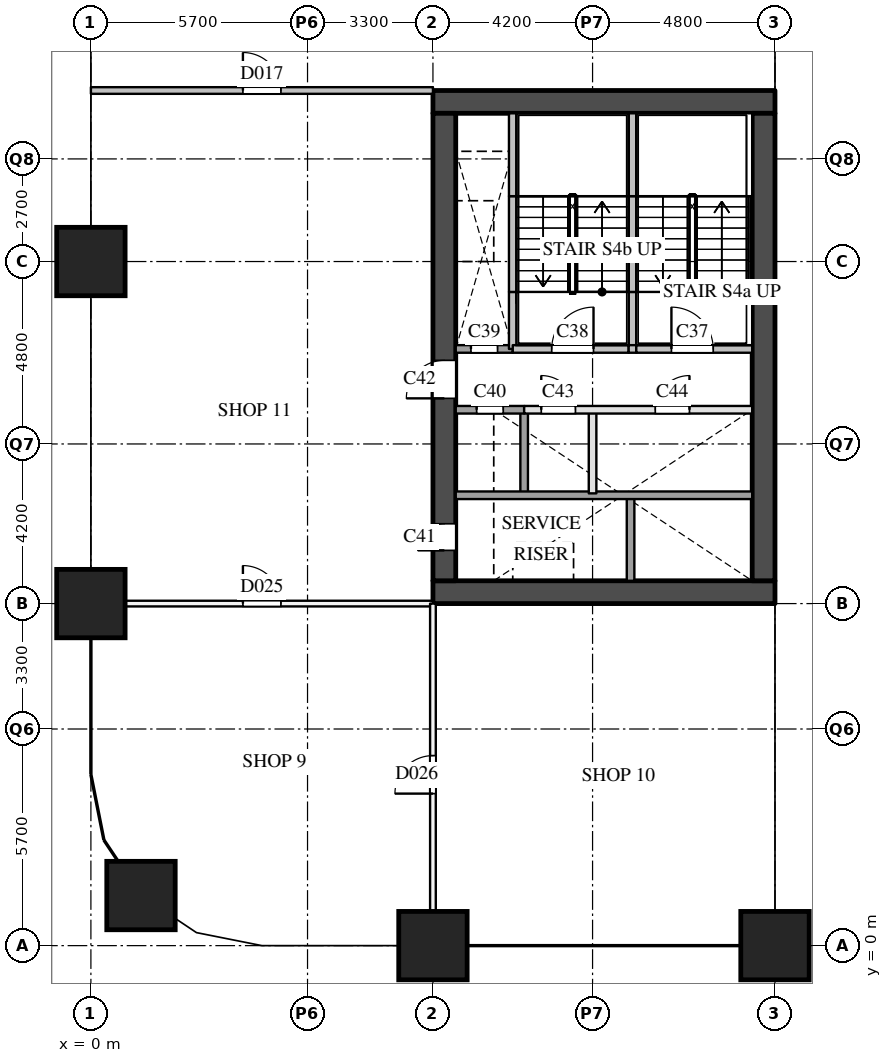
"""IFC4 building model, lengths in metres.
Left out: names, types, materials, properties, quantities, classifications, styles, units other than length and angle.
Written with IfcOpenShell. Run it as: python <this file> out.ifc"""

import sys

from ifc_helpers import new_model, si_unit, direction, frame, frame_2d, origin, origin_2d, place, context, subcontext, project, spatial, rectangle, extrude, element, fill, save


model = new_model("IFC4")
c1 = context("Model", 3, precision=1e-05, world=origin(), true_north=direction((0.0, 1.0)))
c2 = subcontext(c1, "Body", "Model", "MODEL_VIEW")
j1 = project(units=[si_unit("LENGTHUNIT", "METRE"), si_unit("PLANEANGLEUNIT", "RADIAN")], contexts=[c1])
p1 = place(None, origin())
s1 = spatial("IfcSite", under=j1, at=p1, CompositionType="ELEMENT")
p2 = place(p1, origin())
s2 = spatial("IfcBuilding", under=s1, at=p2, CompositionType="ELEMENT")
p3 = place(p2, frame((0.0, 0.0, 14.0)))
s3 = spatial("IfcBuildingStorey", under=s2, at=p3, CompositionType="ELEMENT", Elevation=14.0)
for number, where, z_axis, x_axis in (
    (1, (1.318, 1.318, 0.0), (0.0, 0.0, 1.0), (1.0, 0.0, 0.0)),
    (2, (0.0, 9.0, 0.0), (0.0, 0.0, 1.0), (1.0, 0.0, 0.0)),
    (3, (0.0, 18.0, 0.0), (0.0, 0.0, 1.0), (1.0, 0.0, 0.0)),
    (4, (9.0, 0.0, 0.0), (0.0, 0.0, 1.0), (1.0, 0.0, 0.0)),
    (5, (18.0, 0.0, 0.0), (0.0, 0.0, 1.0), (1.0, 0.0, 0.0)),
):
    element("IfcColumn", number, at=place(p3, frame(where, z_axis=z_axis, x_axis=x_axis)), inside=s3, PredefinedType="COLUMN", context=c2, shape_type="SweptSolid", body=[
        extrude(rectangle(XDim=1.8, YDim=1.8, at=origin_2d()), origin(), (0.0, 0.0, 1.0), 7.0),
    ])
for number, where, z_axis, x_axis in (
    (6, (9.0, 9.3, 0.0), (0.0, 0.0, 1.0), (1.0, 0.0, 0.0)),
    (7, (9.0, 22.2, 0.0), (0.0, 0.0, 1.0), (1.0, 0.0, 0.0)),
):
    element("IfcWall", number, at=place(p3, frame(where, z_axis=z_axis, x_axis=x_axis)), inside=s3, PredefinedType="SHEAR", context=c2, shape_type="SweptSolid", body=[
        extrude(rectangle(XDim=9.0, YDim=0.6, at=frame_2d((4.5, 0.0))), origin(), (0.0, 0.0, 1.0), 6.59),
    ])
p4 = place(p3, frame((9.3, 9.6, 0.0), z_axis=(0.0, 0.0, 1.0), x_axis=(0.0, 1.0, 0.0)))
e8 = element("IfcWall", 8, at=p4, inside=s3, PredefinedType="SHEAR", context=c2, shape_type="SweptSolid", body=[
    extrude(rectangle(XDim=12.3, YDim=0.6, at=frame_2d((6.15, 0.0))), origin(), (0.0, 0.0, 1.0), 6.59),
])
p5 = place(p4, frame((0.8, 0.0, 0.0)))
e9 = element("IfcOpeningElement", 9, at=p5, cuts=e8, PredefinedType="OPENING", context=c2, shape_type="SweptSolid", body=[
    extrude(rectangle(XDim=0.7, YDim=2.1, at=frame_2d((0.35, 1.05))), frame((0.0, 0.31, 0.0), z_axis=(0.0, -1.0, 0.0), x_axis=(1.0, 0.0, 0.0)), (0.0, 0.0, 1.0), 0.62),
])
p6 = place(p4, frame((4.8, 0.0, 0.0)))
e10 = element("IfcOpeningElement", 10, at=p6, cuts=e8, PredefinedType="OPENING", context=c2, shape_type="SweptSolid", body=[
    extrude(rectangle(XDim=1.0, YDim=2.1, at=frame_2d((0.5, 1.05))), frame((0.0, 0.31, 0.0), z_axis=(0.0, -1.0, 0.0), x_axis=(1.0, 0.0, 0.0)), (0.0, 0.0, 1.0), 0.62),
])
p7 = place(p3, frame((17.7, 9.6, 0.0), z_axis=(0.0, 0.0, 1.0), x_axis=(0.0, 1.0, 0.0)))
e11 = element("IfcWall", 11, at=p7, inside=s3, PredefinedType="SHEAR", context=c2, shape_type="SweptSolid", body=[
    extrude(rectangle(XDim=12.3, YDim=0.6, at=frame_2d((6.15, 0.0))), origin(), (0.0, 0.0, 1.0), 6.59),
])
p8 = place(p3, frame((11.1, 15.7, 0.0), z_axis=(0.0, 0.0, 1.0), x_axis=(0.0, 1.0, 0.0)))
e12 = element("IfcWall", 12, at=p8, inside=s3, PredefinedType="SOLIDWALL", context=c2, shape_type="SweptSolid", body=[
    extrude(rectangle(XDim=1.5, YDim=0.2, at=frame_2d((0.75, 0.0))), origin(), (0.0, 0.0, 1.0), 6.59),
])
p9 = place(p3, frame((11.1, 17.2, 0.0), z_axis=(0.0, 0.0, 1.0), x_axis=(0.0, 1.0, 0.0)))
e13 = element("IfcWall", 13, at=p9, inside=s3, PredefinedType="SOLIDWALL", context=c2, shape_type="SweptSolid", body=[
    extrude(rectangle(XDim=2.52, YDim=0.2, at=frame_2d((1.26, 0.0))), origin(), (0.0, 0.0, 1.0), 6.59),
])
p10 = place(p3, frame((11.1, 19.72, 0.0), z_axis=(0.0, 0.0, 1.0), x_axis=(0.0, 1.0, 0.0)))
e14 = element("IfcWall", 14, at=p10, inside=s3, PredefinedType="SOLIDWALL", context=c2, shape_type="SweptSolid", body=[
    extrude(rectangle(XDim=2.18, YDim=0.2, at=frame_2d((1.09, 0.0))), origin(), (0.0, 0.0, 1.0), 6.59),
])
p11 = place(p3, frame((11.4, 11.9, 0.0), z_axis=(0.0, 0.0, 1.0), x_axis=(0.0, 1.0, 0.0)))
e15 = element("IfcWall", 15, at=p11, inside=s3, PredefinedType="SOLIDWALL", context=c2, shape_type="SweptSolid", body=[
    extrude(rectangle(XDim=2.2, YDim=0.2, at=frame_2d((1.1, 0.0))), origin(), (0.0, 0.0, 1.0), 6.59),
])
p12 = place(p3, frame((13.2, 11.9, 0.0), z_axis=(0.0, 0.0, 1.0), x_axis=(0.0, 1.0, 0.0)))
e16 = element("IfcWall", 16, at=p12, inside=s3, PredefinedType="PARTITIONING", context=c2, shape_type="SweptSolid", body=[
    extrude(rectangle(XDim=2.2, YDim=0.2, at=frame_2d((1.1, 0.0))), origin(), (0.0, 0.0, 1.0), 6.59),
])
p13 = place(p3, frame((14.2, 9.6, 0.0), z_axis=(0.0, 0.0, 1.0), x_axis=(0.0, 1.0, 0.0)))
e17 = element("IfcWall", 17, at=p13, inside=s3, PredefinedType="SOLIDWALL", context=c2, shape_type="SweptSolid", body=[
    extrude(rectangle(XDim=2.3, YDim=0.2, at=frame_2d((1.15, 0.0))), origin(), (0.0, 0.0, 1.0), 6.59),
])
p14 = place(p3, frame((14.25, 15.7, 0.0), z_axis=(0.0, 0.0, 1.0), x_axis=(0.0, 1.0, 0.0)))
e18 = element("IfcWall", 18, at=p14, inside=s3, PredefinedType="SOLIDWALL", context=c2, shape_type="SweptSolid", body=[
    extrude(rectangle(XDim=1.5, YDim=0.2, at=frame_2d((0.75, 0.0))), origin(), (0.0, 0.0, 1.0), 6.59),
])
p15 = place(p3, frame((14.25, 17.2, 0.0), z_axis=(0.0, 0.0, 1.0), x_axis=(0.0, 1.0, 0.0)))
e19 = element("IfcWall", 19, at=p15, inside=s3, PredefinedType="SOLIDWALL", context=c2, shape_type="SweptSolid", body=[
    extrude(rectangle(XDim=2.52, YDim=0.2, at=frame_2d((1.26, 0.0))), origin(), (0.0, 0.0, 1.0), 6.59),
])
p16 = place(p3, frame((14.25, 19.72, 0.0), z_axis=(0.0, 0.0, 1.0), x_axis=(0.0, 1.0, 0.0)))
e20 = element("IfcWall", 20, at=p16, inside=s3, PredefinedType="SOLIDWALL", context=c2, shape_type="SweptSolid", body=[
    extrude(rectangle(XDim=2.18, YDim=0.2, at=frame_2d((1.09, 0.0))), origin(), (0.0, 0.0, 1.0), 6.59),
])
p17 = place(p3, frame((9.6, 11.85, 0.0), z_axis=(0.0, 0.0, 1.0), x_axis=(1.0, 0.0, 0.0)))
e21 = element("IfcWall", 21, at=p17, inside=s3, PredefinedType="SOLIDWALL", context=c2, shape_type="SweptSolid", body=[
    extrude(rectangle(XDim=7.8, YDim=0.2, at=frame_2d((3.9, 0.0))), origin(), (0.0, 0.0, 1.0), 6.59),
])
p18 = place(p3, frame((11.4, 14.1, 0.0), z_axis=(0.0, 0.0, 1.0), x_axis=(1.0, 0.0, 0.0)))
e22 = element("IfcWall", 22, at=p18, inside=s3, PredefinedType="PARTITIONING", context=c2, shape_type="SweptSolid", body=[
    extrude(rectangle(XDim=6.0, YDim=0.2, at=frame_2d((3.0, 0.0))), origin(), (0.0, 0.0, 1.0), 6.59),
])
p19 = place(p18, frame((0.45, 0.0, 0.0)))
e23 = element("IfcOpeningElement", 23, at=p19, cuts=e22, PredefinedType="OPENING", context=c2, shape_type="SweptSolid", body=[
    extrude(rectangle(XDim=0.9, YDim=2.1, at=frame_2d((0.45, 1.05))), frame((0.0, 0.11, 0.0), z_axis=(0.0, -1.0, 0.0), x_axis=(1.0, 0.0, 0.0)), (0.0, 0.0, 1.0), 0.22),
])
p20 = place(p18, frame((3.45, 0.0, 0.0)))
e24 = element("IfcOpeningElement", 24, at=p20, cuts=e22, PredefinedType="OPENING", context=c2, shape_type="SweptSolid", body=[
    extrude(rectangle(XDim=0.9, YDim=2.1, at=frame_2d((0.45, 1.05))), frame((0.0, 0.11, 0.0), z_axis=(0.0, -1.0, 0.0), x_axis=(1.0, 0.0, 0.0)), (0.0, 0.0, 1.0), 0.22),
])
p21 = place(p3, frame((9.6, 14.1, 0.0), z_axis=(0.0, 0.0, 1.0), x_axis=(1.0, 0.0, 0.0)))
e25 = element("IfcWall", 25, at=p21, inside=s3, PredefinedType="SOLIDWALL", context=c2, shape_type="SweptSolid", body=[
    extrude(rectangle(XDim=1.8, YDim=0.2, at=frame_2d((0.9, 0.0))), origin(), (0.0, 0.0, 1.0), 6.59),
])
p22 = place(p21, frame((0.55, 0.0, 0.0)))
e26 = element("IfcOpeningElement", 26, at=p22, cuts=e25, PredefinedType="OPENING", context=c2, shape_type="SweptSolid", body=[
    extrude(rectangle(XDim=0.7, YDim=2.1, at=frame_2d((0.35, 1.05))), frame((0.0, 0.11, 0.0), z_axis=(0.0, -1.0, 0.0), x_axis=(1.0, 0.0, 0.0)), (0.0, 0.0, 1.0), 0.22),
])
p23 = place(p3, frame((9.6, 15.7, 0.0), z_axis=(0.0, 0.0, 1.0), x_axis=(1.0, 0.0, 0.0)))
e27 = element("IfcWall", 27, at=p23, inside=s3, PredefinedType="SOLIDWALL", context=c2, shape_type="SweptSolid", body=[
    extrude(rectangle(XDim=1.5, YDim=0.2, at=frame_2d((0.75, 0.0))), origin(), (0.0, 0.0, 1.0), 6.59),
])
p24 = place(p23, frame((0.4, 0.0, 0.0)))
e28 = element("IfcOpeningElement", 28, at=p24, cuts=e27, PredefinedType="OPENING", context=c2, shape_type="SweptSolid", body=[
    extrude(rectangle(XDim=0.7, YDim=2.1, at=frame_2d((0.35, 1.05))), frame((0.0, 0.11, 0.0), z_axis=(0.0, -1.0, 0.0), x_axis=(1.0, 0.0, 0.0)), (0.0, 0.0, 1.0), 0.22),
])
p25 = place(p3, frame((11.1, 15.7, 0.0), z_axis=(0.0, 0.0, 1.0), x_axis=(1.0, 0.0, 0.0)))
e29 = element("IfcWall", 29, at=p25, inside=s3, PredefinedType="SOLIDWALL", context=c2, shape_type="SweptSolid", body=[
    extrude(rectangle(XDim=3.05, YDim=0.2, at=frame_2d((1.525, 0.0))), origin(), (0.0, 0.0, 1.0), 6.59),
])
p26 = place(p25, frame((1.025, 0.0, 0.0)))
e30 = element("IfcOpeningElement", 30, at=p26, cuts=e29, PredefinedType="OPENING", context=c2, shape_type="SweptSolid", body=[
    extrude(rectangle(XDim=1.1, YDim=2.1, at=frame_2d((0.55, 1.05))), frame((0.0, 0.11, 0.0), z_axis=(0.0, -1.0, 0.0), x_axis=(1.0, 0.0, 0.0)), (0.0, 0.0, 1.0), 0.22),
])
p27 = place(p3, frame((14.15, 15.7, 0.0), z_axis=(0.0, 0.0, 1.0), x_axis=(1.0, 0.0, 0.0)))
e31 = element("IfcWall", 31, at=p27, inside=s3, PredefinedType="SOLIDWALL", context=c2, shape_type="SweptSolid", body=[
    extrude(rectangle(XDim=0.2, YDim=0.2, at=frame_2d((0.1, 0.0))), origin(), (0.0, 0.0, 1.0), 6.59),
])
p28 = place(p3, frame((14.35, 15.7, 0.0), z_axis=(0.0, 0.0, 1.0), x_axis=(1.0, 0.0, 0.0)))
e32 = element("IfcWall", 32, at=p28, inside=s3, PredefinedType="SOLIDWALL", context=c2, shape_type="SweptSolid", body=[
    extrude(rectangle(XDim=3.05, YDim=0.2, at=frame_2d((1.525, 0.0))), origin(), (0.0, 0.0, 1.0), 6.59),
])
p29 = place(p28, frame((0.925, 0.0, 0.0)))
e33 = element("IfcOpeningElement", 33, at=p29, cuts=e32, PredefinedType="OPENING", context=c2, shape_type="SweptSolid", body=[
    extrude(rectangle(XDim=1.1, YDim=2.1, at=frame_2d((0.55, 1.05))), frame((0.0, 0.11, 0.0), z_axis=(0.0, -1.0, 0.0), x_axis=(1.0, 0.0, 0.0)), (0.0, 0.0, 1.0), 0.22),
])
p30 = place(p3, frame((0.0, 22.5, 0.0), z_axis=(0.0, 0.0, 1.0), x_axis=(1.0, 0.0, 0.0)))
e34 = element("IfcWall", 34, at=p30, inside=s3, PredefinedType="PARTITIONING", context=c2, shape_type="SweptSolid", body=[
    extrude(rectangle(XDim=9.0, YDim=0.175, at=frame_2d((4.5, 0.0))), origin(), (0.0, 0.0, 1.0), 5.59),
])
p31 = place(p30, frame((4.0, 0.0, 0.0)))
e35 = element("IfcOpeningElement", 35, at=p31, cuts=e34, PredefinedType="OPENING", context=c2, shape_type="SweptSolid", body=[
    extrude(rectangle(XDim=1.0, YDim=2.1, at=frame_2d((0.5, 1.05))), frame((0.0, 0.097, 0.0), z_axis=(0.0, -1.0, 0.0), x_axis=(1.0, 0.0, 0.0)), (0.0, 0.0, 1.0), 0.195),
])
p32 = place(p3, frame((0.0, 9.0, 0.0), z_axis=(0.0, 0.0, 1.0), x_axis=(1.0, 0.0, 0.0)))
e36 = element("IfcWall", 36, at=p32, inside=s3, PredefinedType="PARTITIONING", context=c2, shape_type="SweptSolid", body=[
    extrude(rectangle(XDim=9.0, YDim=0.15, at=frame_2d((4.5, 0.0))), origin(), (0.0, 0.0, 1.0), 6.59),
])
p33 = place(p32, frame((4.0, 0.0, 0.0)))
e37 = element("IfcOpeningElement", 37, at=p33, cuts=e36, PredefinedType="OPENING", context=c2, shape_type="SweptSolid", body=[
    extrude(rectangle(XDim=1.0, YDim=2.1, at=frame_2d((0.5, 1.05))), frame((0.0, 0.085, 0.0), z_axis=(0.0, -1.0, 0.0), x_axis=(1.0, 0.0, 0.0)), (0.0, 0.0, 1.0), 0.17),
])
p34 = place(p3, frame((9.0, 0.0, 0.0), z_axis=(0.0, 0.0, 1.0), x_axis=(0.0, 1.0, 0.0)))
e38 = element("IfcWall", 38, at=p34, inside=s3, PredefinedType="PARTITIONING", context=c2, shape_type="SweptSolid", body=[
    extrude(rectangle(XDim=9.0, YDim=0.15, at=frame_2d((4.5, 0.0))), origin(), (0.0, 0.0, 1.0), 6.59),
])
p35 = place(p34, frame((4.0, 0.0, 0.0)))
e39 = element("IfcOpeningElement", 39, at=p35, cuts=e38, PredefinedType="OPENING", context=c2, shape_type="SweptSolid", body=[
    extrude(rectangle(XDim=1.0, YDim=2.1, at=frame_2d((0.5, 1.05))), frame((0.0, 0.085, 0.0), z_axis=(0.0, -1.0, 0.0), x_axis=(1.0, 0.0, 0.0)), (0.0, 0.0, 1.0), 0.17),
])
p36 = place(p29, origin())
e40 = element("IfcDoor", 40, at=p36, inside=s3, OperationType="SINGLE_SWING_LEFT", PredefinedType="DOOR", context=c2, shape_type="SweptSolid", body=[
    extrude(rectangle(XDim=1.1, YDim=2.1, at=frame_2d((0.55, 1.05))), frame((0.0, 0.025, 0.0), z_axis=(0.0, -1.0, 0.0), x_axis=(1.0, 0.0, 0.0)), (0.0, 0.0, 1.0), 0.05),
])
fill(e33, e40)
p37 = place(p26, origin())
e41 = element("IfcDoor", 41, at=p37, inside=s3, OperationType="SINGLE_SWING_RIGHT", PredefinedType="DOOR", context=c2, shape_type="SweptSolid", body=[
    extrude(rectangle(XDim=1.1, YDim=2.1, at=frame_2d((0.55, 1.05))), frame((0.0, 0.025, 0.0), z_axis=(0.0, -1.0, 0.0), x_axis=(1.0, 0.0, 0.0)), (0.0, 0.0, 1.0), 0.05),
])
fill(e30, e41)
p38 = place(p24, origin())
e42 = element("IfcDoor", 42, at=p38, inside=s3, OperationType="SINGLE_SWING_LEFT", PredefinedType="DOOR", context=c2, shape_type="SweptSolid", body=[
    extrude(rectangle(XDim=0.7, YDim=2.1, at=frame_2d((0.35, 1.05))), frame((0.0, 0.025, 0.0), z_axis=(0.0, -1.0, 0.0), x_axis=(1.0, 0.0, 0.0)), (0.0, 0.0, 1.0), 0.05),
])
fill(e28, e42)
p39 = place(p22, origin())
e43 = element("IfcDoor", 43, at=p39, inside=s3, OperationType="SINGLE_SWING_LEFT", PredefinedType="DOOR", context=c2, shape_type="SweptSolid", body=[
    extrude(rectangle(XDim=0.7, YDim=2.1, at=frame_2d((0.35, 1.05))), frame((0.0, 0.025, 0.0), z_axis=(0.0, -1.0, 0.0), x_axis=(1.0, 0.0, 0.0)), (0.0, 0.0, 1.0), 0.05),
])
fill(e26, e43)
p40 = place(p5, origin())
e44 = element("IfcDoor", 44, at=p40, inside=s3, OperationType="SINGLE_SWING_LEFT", PredefinedType="DOOR", context=c2, shape_type="SweptSolid", body=[
    extrude(rectangle(XDim=0.7, YDim=2.1, at=frame_2d((0.35, 1.05))), frame((0.0, 0.025, 0.0), z_axis=(0.0, -1.0, 0.0), x_axis=(1.0, 0.0, 0.0)), (0.0, 0.0, 1.0), 0.05),
])
fill(e9, e44)
p41 = place(p6, origin())
e45 = element("IfcDoor", 45, at=p41, inside=s3, OperationType="SINGLE_SWING_LEFT", PredefinedType="DOOR", context=c2, shape_type="SweptSolid", body=[
    extrude(rectangle(XDim=1.0, YDim=2.1, at=frame_2d((0.5, 1.05))), frame((0.0, 0.025, 0.0), z_axis=(0.0, -1.0, 0.0), x_axis=(1.0, 0.0, 0.0)), (0.0, 0.0, 1.0), 0.05),
])
fill(e10, e45)
p42 = place(p19, origin())
e46 = element("IfcDoor", 46, at=p42, inside=s3, OperationType="SINGLE_SWING_LEFT", PredefinedType="DOOR", context=c2, shape_type="SweptSolid", body=[
    extrude(rectangle(XDim=0.9, YDim=2.1, at=frame_2d((0.45, 1.05))), frame((0.0, 0.025, 0.0), z_axis=(0.0, -1.0, 0.0), x_axis=(1.0, 0.0, 0.0)), (0.0, 0.0, 1.0), 0.05),
])
fill(e23, e46)
p43 = place(p20, origin())
e47 = element("IfcDoor", 47, at=p43, inside=s3, OperationType="SINGLE_SWING_RIGHT", PredefinedType="DOOR", context=c2, shape_type="SweptSolid", body=[
    extrude(rectangle(XDim=0.9, YDim=2.1, at=frame_2d((0.45, 1.05))), frame((0.0, 0.025, 0.0), z_axis=(0.0, -1.0, 0.0), x_axis=(1.0, 0.0, 0.0)), (0.0, 0.0, 1.0), 0.05),
])
fill(e24, e47)
p44 = place(p31, origin())
e48 = element("IfcDoor", 48, at=p44, inside=s3, OperationType="SINGLE_SWING_LEFT", PredefinedType="DOOR", context=c2, shape_type="SweptSolid", body=[
    extrude(rectangle(XDim=1.0, YDim=2.1, at=frame_2d((0.5, 1.05))), frame((0.0, 0.025, 0.0), z_axis=(0.0, -1.0, 0.0), x_axis=(1.0, 0.0, 0.0)), (0.0, 0.0, 1.0), 0.05),
])
fill(e35, e48)
p45 = place(p33, origin())
e49 = element("IfcDoor", 49, at=p45, inside=s3, OperationType="SINGLE_SWING_LEFT", PredefinedType="DOOR", context=c2, shape_type="SweptSolid", body=[
    extrude(rectangle(XDim=1.0, YDim=2.1, at=frame_2d((0.5, 1.05))), frame((0.0, 0.025, 0.0), z_axis=(0.0, -1.0, 0.0), x_axis=(1.0, 0.0, 0.0)), (0.0, 0.0, 1.0), 0.05),
])
fill(e37, e49)
p46 = place(p35, origin())
e50 = element("IfcDoor", 50, at=p46, inside=s3, OperationType="SINGLE_SWING_LEFT", PredefinedType="DOOR", context=c2, shape_type="SweptSolid", body=[
    extrude(rectangle(XDim=1.0, YDim=2.1, at=frame_2d((0.5, 1.05))), frame((0.0, 0.025, 0.0), z_axis=(0.0, -1.0, 0.0), x_axis=(1.0, 0.0, 0.0)), (0.0, 0.0, 1.0), 0.05),
])
fill(e39, e50)
save(model, sys.argv[1])
